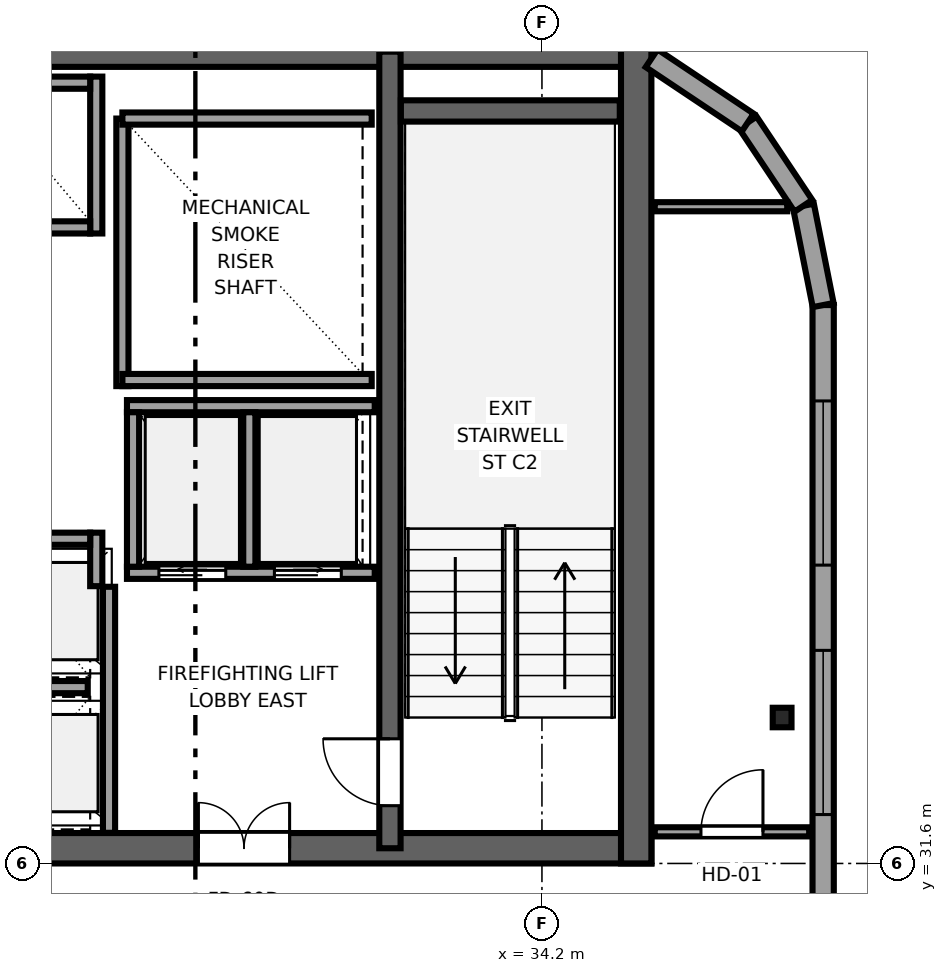
"""IFC4 building model, lengths in metres.
Left out: names, types, materials, properties, quantities, classifications, styles, units other than length and angle.
Written with IfcOpenShell. Run it as: python <this file> out.ifc"""

import sys

from ifc_helpers import new_model, si_unit, direction, frame, frame_2d, origin, origin_2d, place, context, subcontext, project, spatial, rectangle, i_section, extrude, source, transform, mapped, element, fill, save


model = new_model("IFC4")
c1 = context("Model", 3, precision=1e-05, world=origin(), true_north=direction((0.0, 1.0)))
c2 = subcontext(c1, "Body", "Model", "MODEL_VIEW")
j1 = project(units=[si_unit("LENGTHUNIT", "METRE"), si_unit("PLANEANGLEUNIT", "RADIAN")], contexts=[c1])
p1 = place(None, origin())
s1 = spatial("IfcSite", under=j1, at=p1, CompositionType="ELEMENT")
p2 = place(p1, origin())
s2 = spatial("IfcBuilding", under=s1, at=p2, CompositionType="ELEMENT")
p3 = place(p2, frame((0.0, 0.0, 262.95)))
s3 = spatial("IfcBuildingStorey", under=s2, at=p3, CompositionType="ELEMENT", Elevation=262.95)
p4 = place(p3, frame((10.0, 31.85, 0.0), z_axis=(0.0, 0.0, 1.0), x_axis=(1.0, 0.0, 0.0)))
e1 = element("IfcWall", 1, at=p4, inside=s3, PredefinedType="SHEAR", context=c2, shape_type="SweptSolid", body=[
    extrude(rectangle(XDim=26.0, YDim=0.5, at=frame_2d((13.0, 0.0))), origin(), (0.0, 0.0, 1.0), 3.55),
])
p5 = place(p4, frame((7.45, 0.0, 0.0), z_axis=(0.0, 0.0, 1.0), x_axis=(-1.0, 0.0, 0.0)))
e2 = element("IfcOpeningElement", 2, at=p5, cuts=e1, PredefinedType="OPENING", context=c2, shape_type="SweptSolid", body=[
    extrude(rectangle(XDim=1.5, YDim=2.04, at=frame_2d((0.75, 1.02))), frame((0.0, 0.26, 0.0), z_axis=(0.0, -1.0, 0.0), x_axis=(1.0, 0.0, 0.0)), (0.0, 0.0, 1.0), 0.52),
])
p6 = place(p4, frame((13.75, 0.0, 0.0), z_axis=(0.0, 0.0, 1.0), x_axis=(-1.0, 0.0, 0.0)))
e3 = element("IfcOpeningElement", 3, at=p6, cuts=e1, PredefinedType="OPENING", context=c2, shape_type="SweptSolid", body=[
    extrude(rectangle(XDim=1.5, YDim=2.04, at=frame_2d((0.75, 1.02))), frame((0.0, 0.26, 0.0), z_axis=(0.0, -1.0, 0.0), x_axis=(1.0, 0.0, 0.0)), (0.0, 0.0, 1.0), 0.52),
])
p7 = place(p4, frame((20.05, 0.0, 0.0), z_axis=(0.0, 0.0, 1.0), x_axis=(-1.0, 0.0, 0.0)))
e4 = element("IfcOpeningElement", 4, at=p7, cuts=e1, PredefinedType="OPENING", context=c2, shape_type="SweptSolid", body=[
    extrude(rectangle(XDim=1.5, YDim=2.04, at=frame_2d((0.75, 1.02))), frame((0.0, 0.26, 0.0), z_axis=(0.0, -1.0, 0.0), x_axis=(1.0, 0.0, 0.0)), (0.0, 0.0, 1.0), 0.52),
])
p8 = place(p3, frame((10.0, 44.95, 0.0), z_axis=(0.0, 0.0, 1.0), x_axis=(1.0, 0.0, 0.0)))
e5 = element("IfcWall", 5, at=p8, inside=s3, PredefinedType="SHEAR", context=c2, shape_type="SweptSolid", body=[
    extrude(rectangle(XDim=26.0, YDim=0.5, at=frame_2d((13.0, 0.0))), origin(), (0.0, 0.0, 1.0), 3.55),
])
p9 = place(p3, frame((35.75, 31.6, 0.0), z_axis=(0.0, 0.0, 1.0), x_axis=(0.0, 1.0, 0.0)))
e6 = element("IfcWall", 6, at=p9, inside=s3, PredefinedType="SHEAR", context=c2, shape_type="SweptSolid", body=[
    extrude(rectangle(XDim=13.6, YDim=0.5, at=frame_2d((6.8, 0.0))), origin(), (0.0, 0.0, 1.0), 3.55),
])
p10 = place(p3, frame((31.7, 31.85, 0.0), z_axis=(0.0, 0.0, 1.0), x_axis=(0.0, 1.0, 0.0)))
e7 = element("IfcWall", 7, at=p10, inside=s3, PredefinedType="SHEAR", context=c2, shape_type="SweptSolid", body=[
    extrude(rectangle(XDim=13.1, YDim=0.35, at=frame_2d((6.55, 0.0))), origin(), (0.0, 0.0, 1.0), 3.55),
])
p11 = place(p10, frame((1.8, 0.0, 0.0), z_axis=(0.0, 0.0, 1.0), x_axis=(-1.0, 0.0, 0.0)))
e8 = element("IfcOpeningElement", 8, at=p11, cuts=e7, PredefinedType="OPENING", context=c2, shape_type="SweptSolid", body=[
    extrude(rectangle(XDim=1.1, YDim=2.12, at=frame_2d((0.55, 1.06))), frame((0.0, 0.185, 0.0), z_axis=(0.0, -1.0, 0.0), x_axis=(1.0, 0.0, 0.0)), (0.0, 0.0, 1.0), 0.37),
])
p12 = place(p3, frame((31.88, 43.975, 0.0), z_axis=(0.0, 0.0, 1.0), x_axis=(1.0, 0.0, 0.0)))
e9 = element("IfcWall", 9, at=p12, inside=s3, PredefinedType="SHEAR", context=c2, shape_type="SweptSolid", body=[
    extrude(rectangle(XDim=3.6, YDim=0.35, at=frame_2d((1.8, 0.0))), origin(), (0.0, 0.0, 1.0), 3.55),
])
m1 = source(origin(), c2, "Body", "SweptSolid", [
    extrude(i_section(OverallWidth=0.309, OverallDepth=0.321, WebThickness=0.014, FlangeThickness=0.022, FilletRadius=0.017, at=origin_2d()), origin(), (0.0, 0.0, 1.0), 3.55),
])
p13 = place(p3, frame((38.15, 34.0, 0.0), z_axis=(0.0, 0.0, 1.0), x_axis=(1.0, 0.0, 0.0)))
e10 = element("IfcColumn", 10, at=p13, inside=s3, PredefinedType="COLUMN", context=c2, shape_type="MappedRepresentation", body=[
    mapped(m1, transform((0.0, 0.0, 0.0), x_axis=(1.0, 0.0, 0.0), y_axis=(0.0, 1.0, 0.0), z_axis=(0.0, 0.0, 1.0), scale=1.0)),
])
p14 = place(p3, frame((38.825, 7.017, 0.0), z_axis=(0.0, 0.0, 1.0), x_axis=(0.0, 1.0, 0.0)))
e11 = element("IfcWall", 11, at=p14, inside=s3, PredefinedType="SOLIDWALL", context=c2, shape_type="SweptSolid", body=[
    extrude(rectangle(XDim=33.766, YDim=0.35, at=frame_2d((16.883, 0.0))), origin(), (0.0, 0.0, 1.0), 3.37),
])
p15 = place(p14, frame((1.576, 0.0, 0.68)))
e12 = element("IfcOpeningElement", 12, at=p15, cuts=e11, PredefinedType="OPENING", context=c2, shape_type="SweptSolid", body=[
    extrude(rectangle(XDim=2.7, YDim=1.95, at=frame_2d((1.35, 0.975))), frame((0.0, 0.185, 0.0), z_axis=(0.0, -1.0, 0.0), x_axis=(1.0, 0.0, 0.0)), (0.0, 0.0, 1.0), 0.37),
])
p16 = place(p14, frame((6.228, 0.0, 0.68)))
e13 = element("IfcOpeningElement", 13, at=p16, cuts=e11, PredefinedType="OPENING", context=c2, shape_type="SweptSolid", body=[
    extrude(rectangle(XDim=2.7, YDim=1.95, at=frame_2d((1.35, 0.975))), frame((0.0, 0.185, 0.0), z_axis=(0.0, -1.0, 0.0), x_axis=(1.0, 0.0, 0.0)), (0.0, 0.0, 1.0), 0.37),
])
p17 = place(p14, frame((10.881, 0.0, 0.68)))
e14 = element("IfcOpeningElement", 14, at=p17, cuts=e11, PredefinedType="OPENING", context=c2, shape_type="SweptSolid", body=[
    extrude(rectangle(XDim=2.7, YDim=1.95, at=frame_2d((1.35, 0.975))), frame((0.0, 0.185, 0.0), z_axis=(0.0, -1.0, 0.0), x_axis=(1.0, 0.0, 0.0)), (0.0, 0.0, 1.0), 0.37),
])
p18 = place(p14, frame((15.533, 0.0, 0.68)))
e15 = element("IfcOpeningElement", 15, at=p18, cuts=e11, PredefinedType="OPENING", context=c2, shape_type="SweptSolid", body=[
    extrude(rectangle(XDim=2.7, YDim=1.95, at=frame_2d((1.35, 0.975))), frame((0.0, 0.185, 0.0), z_axis=(0.0, -1.0, 0.0), x_axis=(1.0, 0.0, 0.0)), (0.0, 0.0, 1.0), 0.37),
])
p19 = place(p14, frame((20.185, 0.0, 0.68)))
e16 = element("IfcOpeningElement", 16, at=p19, cuts=e11, PredefinedType="OPENING", context=c2, shape_type="SweptSolid", body=[
    extrude(rectangle(XDim=2.7, YDim=1.95, at=frame_2d((1.35, 0.975))), frame((0.0, 0.185, 0.0), z_axis=(0.0, -1.0, 0.0), x_axis=(1.0, 0.0, 0.0)), (0.0, 0.0, 1.0), 0.37),
])
p20 = place(p14, frame((25.387, 0.0, 0.68)))
e17 = element("IfcOpeningElement", 17, at=p20, cuts=e11, PredefinedType="OPENING", context=c2, shape_type="SweptSolid", body=[
    extrude(rectangle(XDim=2.7, YDim=1.95, at=frame_2d((1.35, 0.975))), frame((0.0, 0.185, 0.0), z_axis=(0.0, -1.0, 0.0), x_axis=(1.0, 0.0, 0.0)), (0.0, 0.0, 1.0), 0.37),
])
p21 = place(p14, frame((29.489, 0.0, 0.68)))
e18 = element("IfcOpeningElement", 18, at=p21, cuts=e11, PredefinedType="OPENING", context=c2, shape_type="SweptSolid", body=[
    extrude(rectangle(XDim=2.7, YDim=1.95, at=frame_2d((1.35, 0.975))), frame((0.0, 0.185, 0.0), z_axis=(0.0, -1.0, 0.0), x_axis=(1.0, 0.0, 0.0)), (0.0, 0.0, 1.0), 0.37),
])
p22 = place(p3, frame((38.825, 40.783, 0.0), z_axis=(0.0, 0.0, 1.0), x_axis=(-0.195044345786, 0.980794424524, 0.0)))
e19 = element("IfcWall", 19, at=p22, inside=s3, PredefinedType="SOLIDWALL", context=c2, shape_type="SweptSolid", body=[
    extrude(rectangle(XDim=1.665, YDim=0.35, at=frame_2d((0.833, 0.0))), origin(), (0.0, 0.0, 1.0), 3.37),
])
p23 = place(p3, frame((38.5, 42.416, 0.0), z_axis=(0.0, 0.0, 1.0), x_axis=(-0.555520825599, 0.831502623162, 0.0)))
e20 = element("IfcWall", 20, at=p23, inside=s3, PredefinedType="SOLIDWALL", context=c2, shape_type="SweptSolid", body=[
    extrude(rectangle(XDim=1.647, YDim=0.35, at=frame_2d((0.824, 0.0))), origin(), (0.0, 0.0, 1.0), 3.37),
])
p24 = place(p3, frame((37.585, 43.785, 0.0), z_axis=(0.0, 0.0, 1.0), x_axis=(-0.831516639465, 0.555499845448, 0.0)))
e21 = element("IfcWall", 21, at=p24, inside=s3, PredefinedType="SOLIDWALL", context=c2, shape_type="SweptSolid", body=[
    extrude(rectangle(XDim=1.902, YDim=0.35, at=frame_2d((0.951, 0.0))), origin(), (0.0, 0.0, 1.0), 3.37),
])
p25 = place(p3, frame((27.3, 39.45, 0.0), z_axis=(0.0, 0.0, 1.0), x_axis=(0.0, 1.0, 0.0)))
e22 = element("IfcWall", 22, at=p25, inside=s3, PredefinedType="SOLIDWALL", context=c2, shape_type="SweptSolid", body=[
    extrude(rectangle(XDim=4.4, YDim=0.2, at=frame_2d((2.2, 0.0))), origin(), (0.0, 0.0, 1.0), 3.37),
])
for number, where, z_axis, x_axis in (
    (23, (27.3, 39.55, 0.0), (0.0, 0.0, 1.0), (1.0, 0.0, 0.0)),
    (24, (27.3, 43.85, 0.0), (0.0, 0.0, 1.0), (1.0, 0.0, 0.0)),
):
    element("IfcWall", number, at=place(p3, frame(where, z_axis=z_axis, x_axis=x_axis)), inside=s3, PredefinedType="SOLIDWALL", context=c2, shape_type="SweptSolid", body=[
        extrude(rectangle(XDim=4.1, YDim=0.2, at=frame_2d((2.05, 0.0))), origin(), (0.0, 0.0, 1.0), 3.37),
    ])
p26 = place(p3, frame((27.08, 32.104, 0.0), z_axis=(0.0, 0.0, 1.0), x_axis=(0.0, 1.0, 0.0)))
e25 = element("IfcWall", 25, at=p26, inside=s3, PredefinedType="SOLIDWALL", context=c2, shape_type="SweptSolid", body=[
    extrude(rectangle(XDim=4.046, YDim=0.2, at=frame_2d((2.023, 0.0))), origin(), (0.0, 0.0, 1.0), 3.37),
])
p27 = place(p3, frame((27.375, 36.38, 0.0), z_axis=(0.0, 0.0, 1.0), x_axis=(1.0, 0.0, 0.0)))
e26 = element("IfcWall", 26, at=p27, inside=s3, PredefinedType="SOLIDWALL", context=c2, shape_type="SweptSolid", body=[
    extrude(rectangle(XDim=4.075, YDim=0.2, at=frame_2d((2.038, 0.0))), origin(), (0.0, 0.0, 1.0), 3.37),
])
p28 = place(p27, frame((0.525, 0.0, 0.0)))
e27 = element("IfcOpeningElement", 27, at=p28, cuts=e26, PredefinedType="OPENING", context=c2, shape_type="SweptSolid", body=[
    extrude(rectangle(XDim=1.1, YDim=2.12, at=frame_2d((0.55, 1.06))), frame((0.0, 0.11, 0.0), z_axis=(0.0, -1.0, 0.0), x_axis=(1.0, 0.0, 0.0)), (0.0, 0.0, 1.0), 0.22),
])
p29 = place(p27, frame((2.425, 0.0, 0.0)))
e28 = element("IfcOpeningElement", 28, at=p29, cuts=e26, PredefinedType="OPENING", context=c2, shape_type="SweptSolid", body=[
    extrude(rectangle(XDim=1.1, YDim=2.12, at=frame_2d((0.55, 1.06))), frame((0.0, 0.11, 0.0), z_axis=(0.0, -1.0, 0.0), x_axis=(1.0, 0.0, 0.0)), (0.0, 0.0, 1.0), 0.22),
])
p30 = place(p3, frame((27.375, 39.12, 0.0), z_axis=(0.0, 0.0, 1.0), x_axis=(1.0, 0.0, 0.0)))
e29 = element("IfcWall", 29, at=p30, inside=s3, PredefinedType="SOLIDWALL", context=c2, shape_type="SweptSolid", body=[
    extrude(rectangle(XDim=4.075, YDim=0.2, at=frame_2d((2.038, 0.0))), origin(), (0.0, 0.0, 1.0), 3.37),
])
for number, where, z_axis, x_axis in (
    (30, (27.475, 36.48, 0.0), (0.0, 0.0, 1.0), (0.0, 1.0, 0.0)),
    (31, (29.387, 36.48, 0.0), (0.0, 0.0, 1.0), (0.0, 1.0, 0.0)),
):
    element("IfcWall", number, at=place(p3, frame(where, z_axis=z_axis, x_axis=x_axis)), inside=s3, PredefinedType="SOLIDWALL", context=c2, shape_type="SweptSolid", body=[
        extrude(rectangle(XDim=2.54, YDim=0.2, at=frame_2d((1.27, 0.0))), origin(), (0.0, 0.0, 1.0), 3.37),
    ])
p31 = place(p3, frame((26.87, 36.16, 0.0), z_axis=(0.0, 0.0, 1.0), x_axis=(0.0, 1.0, 0.0)))
e32 = element("IfcWall", 32, at=p31, inside=s3, PredefinedType="SOLIDWALL", context=c2, shape_type="SweptSolid", body=[
    extrude(rectangle(XDim=0.88, YDim=0.2, at=frame_2d((0.44, 0.0))), origin(), (0.0, 0.0, 1.0), 3.37),
])
p32 = place(p3, frame((24.93, 36.94, 0.0), z_axis=(0.0, 0.0, 1.0), x_axis=(1.0, 0.0, 0.0)))
e33 = element("IfcWall", 33, at=p32, inside=s3, PredefinedType="SOLIDWALL", context=c2, shape_type="SweptSolid", body=[
    extrude(rectangle(XDim=1.84, YDim=0.2, at=frame_2d((0.92, 0.0))), origin(), (0.0, 0.0, 1.0), 3.37),
])
p33 = place(p3, frame((24.93, 34.5, 0.0), z_axis=(0.0, 0.0, 1.0), x_axis=(1.0, 0.0, 0.0)))
e34 = element("IfcWall", 34, at=p33, inside=s3, PredefinedType="SOLIDWALL", context=c2, shape_type="SweptSolid", body=[
    extrude(rectangle(XDim=1.8, YDim=0.2, at=frame_2d((0.9, 0.0))), origin(), (0.0, 0.0, 1.0), 3.37),
])
p34 = place(p3, frame((26.87, 41.96, 0.0), z_axis=(0.0, 0.0, 1.0), x_axis=(0.0, 1.0, 0.0)))
e35 = element("IfcWall", 35, at=p34, inside=s3, PredefinedType="SOLIDWALL", context=c2, shape_type="SweptSolid", body=[
    extrude(rectangle(XDim=2.58, YDim=0.2, at=frame_2d((1.29, 0.0))), origin(), (0.0, 0.0, 1.0), 3.37),
])
for number, where, z_axis, x_axis in (
    (36, (24.93, 42.06, 0.0), (0.0, 0.0, 1.0), (1.0, 0.0, 0.0)),
    (37, (24.93, 44.44, 0.0), (0.0, 0.0, 1.0), (1.0, 0.0, 0.0)),
):
    element("IfcWall", number, at=place(p3, frame(where, z_axis=z_axis, x_axis=x_axis)), inside=s3, PredefinedType="SOLIDWALL", context=c2, shape_type="SweptSolid", body=[
        extrude(rectangle(XDim=1.84, YDim=0.2, at=frame_2d((0.92, 0.0))), origin(), (0.0, 0.0, 1.0), 3.37),
    ])
p35 = place(p3, frame((36.055, 32.12, 0.0), z_axis=(0.0, 0.0, 1.0), x_axis=(1.0, 0.0, 0.0)))
e38 = element("IfcWall", 38, at=p35, inside=s3, PredefinedType="PARTITIONING", context=c2, shape_type="SweptSolid", body=[
    extrude(rectangle(XDim=2.54, YDim=0.15, at=frame_2d((1.27, 0.0))), origin(), (0.0, 0.0, 1.0), 3.37),
])
p36 = place(p35, frame((0.76, 0.0, 0.0)))
e39 = element("IfcOpeningElement", 39, at=p36, cuts=e38, PredefinedType="OPENING", context=c2, shape_type="SweptSolid", body=[
    extrude(rectangle(XDim=1.02, YDim=2.03, at=frame_2d((0.51, 1.015))), frame((0.0, 0.085, 0.0), z_axis=(0.0, -1.0, 0.0), x_axis=(1.0, 0.0, 0.0)), (0.0, 0.0, 1.0), 0.17),
])
p37 = place(p3, frame((36.055, 42.4, 0.0), z_axis=(0.0, 0.0, 1.0), x_axis=(1.0, 0.0, 0.0)))
e40 = element("IfcWall", 40, at=p37, inside=s3, PredefinedType="PARTITIONING", context=c2, shape_type="SweptSolid", body=[
    extrude(rectangle(XDim=2.179, YDim=0.15, at=frame_2d((1.089, 0.0))), origin(), (0.0, 0.0, 1.0), 3.37),
])
m2 = source(origin(), c2, "Body", "SweptSolid", [
    extrude(rectangle(XDim=2.7, YDim=1.95, at=frame_2d((1.35, 0.975))), frame((0.0, 0.09, 0.0), z_axis=(0.0, -1.0, 0.0), x_axis=(1.0, 0.0, 0.0)), (0.0, 0.0, 1.0), 0.06),
])
p38 = place(p20, origin())
e41 = element("IfcWindow", 41, at=p38, inside=s3, PartitioningType="TRIPLE_PANEL_HORIZONTAL", PredefinedType="WINDOW", context=c2, shape_type="MappedRepresentation", body=[
    mapped(m2, transform((0.0, 0.0, 0.0), x_axis=(1.0, 0.0, 0.0), y_axis=(0.0, 1.0, 0.0), z_axis=(0.0, 0.0, 1.0), scale=1.0)),
])
fill(e17, e41)
p39 = place(p21, origin())
e42 = element("IfcWindow", 42, at=p39, inside=s3, PartitioningType="TRIPLE_PANEL_HORIZONTAL", PredefinedType="WINDOW", context=c2, shape_type="MappedRepresentation", body=[
    mapped(m2, transform((0.0, 0.0, 0.0), x_axis=(1.0, 0.0, 0.0), y_axis=(0.0, 1.0, 0.0), z_axis=(0.0, 0.0, 1.0), scale=1.0)),
])
fill(e18, e42)
m3 = source(origin(), c2, "Body", "SweptSolid", [
    extrude(rectangle(XDim=1.1, YDim=2.12, at=frame_2d((0.55, 1.06))), frame((0.0, 0.025, 0.0), z_axis=(0.0, -1.0, 0.0), x_axis=(1.0, 0.0, 0.0)), (0.0, 0.0, 1.0), 0.05),
])
p40 = place(p11, origin())
e43 = element("IfcDoor", 43, at=p40, inside=s3, OperationType="SINGLE_SWING_RIGHT", PredefinedType="DOOR", context=c2, shape_type="MappedRepresentation", body=[
    mapped(m3, transform((0.0, 0.0, 0.0), x_axis=(1.0, 0.0, 0.0), y_axis=(0.0, 1.0, 0.0), z_axis=(0.0, 0.0, 1.0), scale=1.0)),
])
fill(e8, e43)
m4 = source(origin(), c2, "Body", "SweptSolid", [
    extrude(rectangle(XDim=1.5, YDim=2.04, at=frame_2d((0.75, 1.02))), frame((0.0, 0.025, 0.0), z_axis=(0.0, -1.0, 0.0), x_axis=(1.0, 0.0, 0.0)), (0.0, 0.0, 1.0), 0.05),
])
p41 = place(p7, origin())
e44 = element("IfcDoor", 44, at=p41, inside=s3, OperationType="DOUBLE_DOOR_SINGLE_SWING", PredefinedType="DOOR", context=c2, shape_type="MappedRepresentation", body=[
    mapped(m4, transform((0.0, 0.0, 0.0), x_axis=(1.0, 0.0, 0.0), y_axis=(0.0, 1.0, 0.0), z_axis=(0.0, 0.0, 1.0), scale=1.0)),
])
fill(e4, e44)
m5 = source(origin(), c2, "Body", "SweptSolid", [
    extrude(rectangle(XDim=1.1, YDim=2.12, at=frame_2d((0.55, 1.06))), frame((0.0, 0.025, 0.0), z_axis=(0.0, -1.0, 0.0), x_axis=(1.0, 0.0, 0.0)), (0.0, 0.0, 1.0), 0.05),
])
p42 = place(p28, origin())
e45 = element("IfcDoor", 45, at=p42, inside=s3, OperationType="SLIDING_TO_LEFT", PredefinedType="DOOR", context=c2, shape_type="MappedRepresentation", body=[
    mapped(m5, transform((0.0, 0.0, 0.0), x_axis=(1.0, 0.0, 0.0), y_axis=(0.0, 1.0, 0.0), z_axis=(0.0, 0.0, 1.0), scale=1.0)),
])
fill(e27, e45)
p43 = place(p29, origin())
e46 = element("IfcDoor", 46, at=p43, inside=s3, OperationType="SLIDING_TO_RIGHT", PredefinedType="DOOR", context=c2, shape_type="MappedRepresentation", body=[
    mapped(m5, transform((0.0, 0.0, 0.0), x_axis=(1.0, 0.0, 0.0), y_axis=(0.0, 1.0, 0.0), z_axis=(0.0, 0.0, 1.0), scale=1.0)),
])
fill(e28, e46)
m6 = source(origin(), c2, "Body", "SweptSolid", [
    extrude(rectangle(XDim=1.02, YDim=2.03, at=frame_2d((0.51, 1.015))), frame((0.0, 0.025, 0.0), z_axis=(0.0, -1.0, 0.0), x_axis=(1.0, 0.0, 0.0)), (0.0, 0.0, 1.0), 0.05),
])
p44 = place(p36, origin())
e47 = element("IfcDoor", 47, at=p44, inside=s3, OperationType="SINGLE_SWING_RIGHT", PredefinedType="DOOR", context=c2, shape_type="MappedRepresentation", body=[
    mapped(m6, transform((0.0, 0.0, 0.0), x_axis=(1.0, 0.0, 0.0), y_axis=(0.0, 1.0, 0.0), z_axis=(0.0, 0.0, 1.0), scale=1.0)),
])
fill(e39, e47)
save(model, sys.argv[1])
